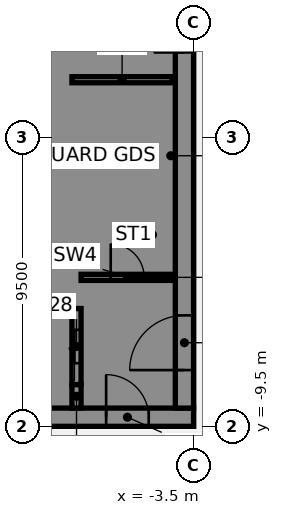
"""IFC4 building model, lengths in metres.
Left out: names, types, materials, properties, quantities, classifications, styles, units other than length and angle.
Written with IfcOpenShell. Run it as: python <this file> out.ifc"""

import sys

from ifc_helpers import new_model, si_unit, direction, frame, frame_2d, origin, place, context, subcontext, project, spatial, polyline, rectangle, outline, extrude, element, fill, save


model = new_model("IFC4")
c1 = context("Model", 3, precision=1e-05, world=origin(), true_north=direction((0.0, 1.0)))
c2 = subcontext(c1, "Body", "Model", "MODEL_VIEW")
j1 = project(units=[si_unit("LENGTHUNIT", "METRE"), si_unit("PLANEANGLEUNIT", "RADIAN")], contexts=[c1])
p1 = place(None, origin())
s1 = spatial("IfcSite", under=j1, at=p1, CompositionType="ELEMENT")
p2 = place(p1, origin())
s2 = spatial("IfcBuilding", under=s1, at=p2, CompositionType="ELEMENT")
p3 = place(p2, frame((0.0, 0.0, 117.25)))
s3 = spatial("IfcBuildingStorey", under=s2, at=p3, CompositionType="ELEMENT", Elevation=117.25)
p4 = place(p3, frame((-16.5, -9.2, 0.0), z_axis=(0.0, 0.0, 1.0), x_axis=(1.0, 0.0, 0.0)))
e1 = element("IfcWall", 1, at=p4, inside=s3, PredefinedType="SHEAR", context=c2, shape_type="SweptSolid", body=[
    extrude(rectangle(XDim=13.0, YDim=0.6, at=frame_2d((6.5, 0.0))), origin(), (0.0, 0.0, 1.0), 3.61),
])
p5 = place(p4, frame((4.15, 0.0, 0.0)))
e2 = element("IfcOpeningElement", 2, at=p5, cuts=e1, PredefinedType="OPENING", context=c2, shape_type="SweptSolid", body=[
    extrude(rectangle(XDim=1.4, YDim=2.1, at=frame_2d((0.7, 1.05))), frame((0.0, 0.31, 0.0), z_axis=(0.0, -1.0, 0.0), x_axis=(1.0, 0.0, 0.0)), (0.0, 0.0, 1.0), 0.62),
])
p6 = place(p4, frame((10.125, 0.0, 0.0)))
e3 = element("IfcOpeningElement", 3, at=p6, cuts=e1, PredefinedType="OPENING", context=c2, shape_type="SweptSolid", body=[
    extrude(rectangle(XDim=1.4, YDim=2.1, at=frame_2d((0.7, 1.05))), frame((0.0, 0.31, 0.0), z_axis=(0.0, -1.0, 0.0), x_axis=(1.0, 0.0, 0.0)), (0.0, 0.0, 1.0), 0.62),
])
p7 = place(p3, origin())
e4 = element("IfcWall", 4, at=p7, inside=s3, PredefinedType="SHEAR", context=c2, shape_type="SweptSolid", body=[
    extrude(outline(polyline([(-9.8, -5.375), (-9.8, -5.625), (-7.5, -5.625), (-7.2, -5.625), (-7.2, 8.9), (-7.5, 8.9), (-9.8, 8.9), (-9.8, 8.125), (-7.5, 8.125), (-7.5, 5.625), (-9.8, 5.625), (-9.8, 5.375), (-7.5, 5.375), (-7.5, 2.875), (-9.8, 2.875), (-9.8, 2.625), (-7.5, 2.625), (-7.5, 0.125), (-9.8, 0.125), (-9.8, -0.125), (-7.5, -0.125), (-7.5, -2.625), (-9.8, -2.625), (-9.8, -2.875), (-7.5, -2.875), (-7.5, -5.375), (-9.8, -5.375)])), origin(), (0.0, 0.0, 1.0), 3.61),
])
p8 = place(p3, origin())
e5 = element("IfcWall", 5, at=p8, inside=s3, PredefinedType="SHEAR", context=c2, shape_type="SweptSolid", body=[
    extrude(outline(polyline([(-7.5, -8.125), (-9.55, -8.125), (-9.55, -5.625), (-9.8, -5.625), (-9.8, -8.125), (-9.8, -8.9), (-7.5, -8.9), (-7.5, -8.125)])), origin(), (0.0, 0.0, 1.0), 3.61),
])
p9 = place(p3, frame((-7.35, -8.9, 0.0), z_axis=(0.0, 0.0, 1.0), x_axis=(0.0, 1.0, 0.0)))
e6 = element("IfcWall", 6, at=p9, inside=s3, PredefinedType="SHEAR", context=c2, shape_type="SweptSolid", body=[
    extrude(rectangle(XDim=0.775, YDim=0.3, at=frame_2d((0.387, 0.0))), origin(), (0.0, 0.0, 1.0), 3.61),
])
p10 = place(p3, frame((-7.5, 1.9, 0.0), z_axis=(0.0, 0.0, 1.0), x_axis=(1.0, 0.0, 0.0)))
e7 = element("IfcWall", 7, at=p10, inside=s3, PredefinedType="SHEAR", context=c2, shape_type="SweptSolid", body=[
    extrude(rectangle(XDim=3.3, YDim=0.2, at=frame_2d((1.65, 0.0))), origin(), (0.0, 0.0, 1.0), 3.61),
])
p11 = place(p3, frame((-7.35, -8.125, 0.0), z_axis=(0.0, 0.0, 1.0), x_axis=(0.0, 1.0, 0.0)))
e8 = element("IfcWall", 8, at=p11, inside=s3, PredefinedType="SHEAR", context=c2, shape_type="SweptSolid", body=[
    extrude(rectangle(XDim=2.5, YDim=0.3, at=frame_2d((1.25, 0.0))), origin(), (0.0, 0.0, 1.0), 3.61),
])
p12 = place(p11, frame((0.7, 0.0, 0.0)))
e9 = element("IfcOpeningElement", 9, at=p12, cuts=e8, PredefinedType="OPENING", context=c2, shape_type="SweptSolid", body=[
    extrude(rectangle(XDim=1.1, YDim=2.1, at=frame_2d((0.55, 1.05))), frame((0.0, 0.16, 0.0), z_axis=(0.0, -1.0, 0.0), x_axis=(1.0, 0.0, 0.0)), (0.0, 0.0, 1.0), 0.32),
])
p13 = place(p3, frame((-3.8, -8.9, 0.0), z_axis=(0.0, 0.0, 1.0), x_axis=(0.0, 1.0, 0.0)))
e10 = element("IfcWall", 10, at=p13, inside=s3, PredefinedType="SHEAR", context=c2, shape_type="SweptSolid", body=[
    extrude(rectangle(XDim=17.8, YDim=0.6, at=frame_2d((8.9, 0.0))), origin(), (0.0, 0.0, 1.0), 3.61),
])
p14 = place(p13, frame((1.25, 0.0, 0.0)))
e11 = element("IfcOpeningElement", 11, at=p14, cuts=e10, PredefinedType="OPENING", context=c2, shape_type="SweptSolid", body=[
    extrude(rectangle(XDim=1.8, YDim=2.1, at=frame_2d((0.9, 1.05))), frame((0.0, 0.31, 0.0), z_axis=(0.0, -1.0, 0.0), x_axis=(1.0, 0.0, 0.0)), (0.0, 0.0, 1.0), 0.62),
])
p15 = place(p13, frame((11.698, 0.0, 0.0)))
e12 = element("IfcOpeningElement", 12, at=p15, cuts=e10, PredefinedType="OPENING", context=c2, shape_type="SweptSolid", body=[
    extrude(rectangle(XDim=1.0, YDim=2.1, at=frame_2d((0.5, 1.05))), frame((0.0, 0.31, 0.0), z_axis=(0.0, -1.0, 0.0), x_axis=(1.0, 0.0, 0.0)), (0.0, 0.0, 1.0), 0.62),
])
p16 = place(p13, frame((15.222, 0.0, 0.0)))
e13 = element("IfcOpeningElement", 13, at=p16, cuts=e10, PredefinedType="OPENING", context=c2, shape_type="SweptSolid", body=[
    extrude(rectangle(XDim=1.0, YDim=2.1, at=frame_2d((0.5, 1.05))), frame((0.0, 0.31, 0.0), z_axis=(0.0, -1.0, 0.0), x_axis=(1.0, 0.0, 0.0)), (0.0, 0.0, 1.0), 0.62),
])
p17 = place(p3, frame((-7.2, -4.6, 0.0), z_axis=(0.0, 0.0, 1.0), x_axis=(1.0, 0.0, 0.0)))
e14 = element("IfcWall", 14, at=p17, inside=s3, PredefinedType="SHEAR", context=c2, shape_type="SweptSolid", body=[
    extrude(rectangle(XDim=3.1, YDim=0.2, at=frame_2d((1.55, 0.0))), origin(), (0.0, 0.0, 1.0), 3.61),
])
p18 = place(p17, frame((0.975, 0.0, 0.0)))
e15 = element("IfcOpeningElement", 15, at=p18, cuts=e14, PredefinedType="OPENING", context=c2, shape_type="SweptSolid", body=[
    extrude(rectangle(XDim=1.1, YDim=2.1, at=frame_2d((0.55, 1.05))), frame((0.0, 0.11, 0.0), z_axis=(0.0, -1.0, 0.0), x_axis=(1.0, 0.0, 0.0)), (0.0, 0.0, 1.0), 0.22),
])
p19 = place(p6, origin())
e16 = element("IfcDoor", 16, at=p19, inside=s3, OperationType="SINGLE_SWING_LEFT", PredefinedType="DOOR", context=c2, shape_type="SweptSolid", body=[
    extrude(rectangle(XDim=1.4, YDim=2.1, at=frame_2d((0.7, 1.05))), frame((0.0, 0.025, 0.0), z_axis=(0.0, -1.0, 0.0), x_axis=(1.0, 0.0, 0.0)), (0.0, 0.0, 1.0), 0.05),
])
fill(e3, e16)
p20 = place(p14, origin())
e17 = element("IfcDoor", 17, at=p20, inside=s3, OperationType="SINGLE_SWING_LEFT", PredefinedType="DOOR", context=c2, shape_type="SweptSolid", body=[
    extrude(rectangle(XDim=1.8, YDim=2.1, at=frame_2d((0.9, 1.05))), frame((0.0, 0.025, 0.0), z_axis=(0.0, -1.0, 0.0), x_axis=(1.0, 0.0, 0.0)), (0.0, 0.0, 1.0), 0.05),
])
fill(e11, e17)
p21 = place(p15, origin())
e18 = element("IfcDoor", 18, at=p21, inside=s3, OperationType="SINGLE_SWING_LEFT", PredefinedType="DOOR", context=c2, shape_type="SweptSolid", body=[
    extrude(rectangle(XDim=1.0, YDim=2.1, at=frame_2d((0.5, 1.05))), frame((0.0, 0.275, 0.0), z_axis=(0.0, -1.0, 0.0), x_axis=(1.0, 0.0, 0.0)), (0.0, 0.0, 1.0), 0.05),
])
fill(e12, e18)
p22 = place(p18, origin())
e19 = element("IfcDoor", 19, at=p22, inside=s3, OperationType="SINGLE_SWING_LEFT", PredefinedType="DOOR", context=c2, shape_type="SweptSolid", body=[
    extrude(rectangle(XDim=1.1, YDim=2.1, at=frame_2d((0.55, 1.05))), frame((0.0, 0.025, 0.0), z_axis=(0.0, -1.0, 0.0), x_axis=(1.0, 0.0, 0.0)), (0.0, 0.0, 1.0), 0.05),
])
fill(e15, e19)
p23 = place(p12, origin())
e20 = element("IfcDoor", 20, at=p23, inside=s3, OperationType="SLIDING_TO_LEFT", PredefinedType="DOOR", context=c2, shape_type="SweptSolid", body=[
    extrude(rectangle(XDim=1.1, YDim=2.1, at=frame_2d((0.55, 1.05))), frame((0.0, 0.025, 0.0), z_axis=(0.0, -1.0, 0.0), x_axis=(1.0, 0.0, 0.0)), (0.0, 0.0, 1.0), 0.05),
])
fill(e9, e20)
save(model, sys.argv[1])
